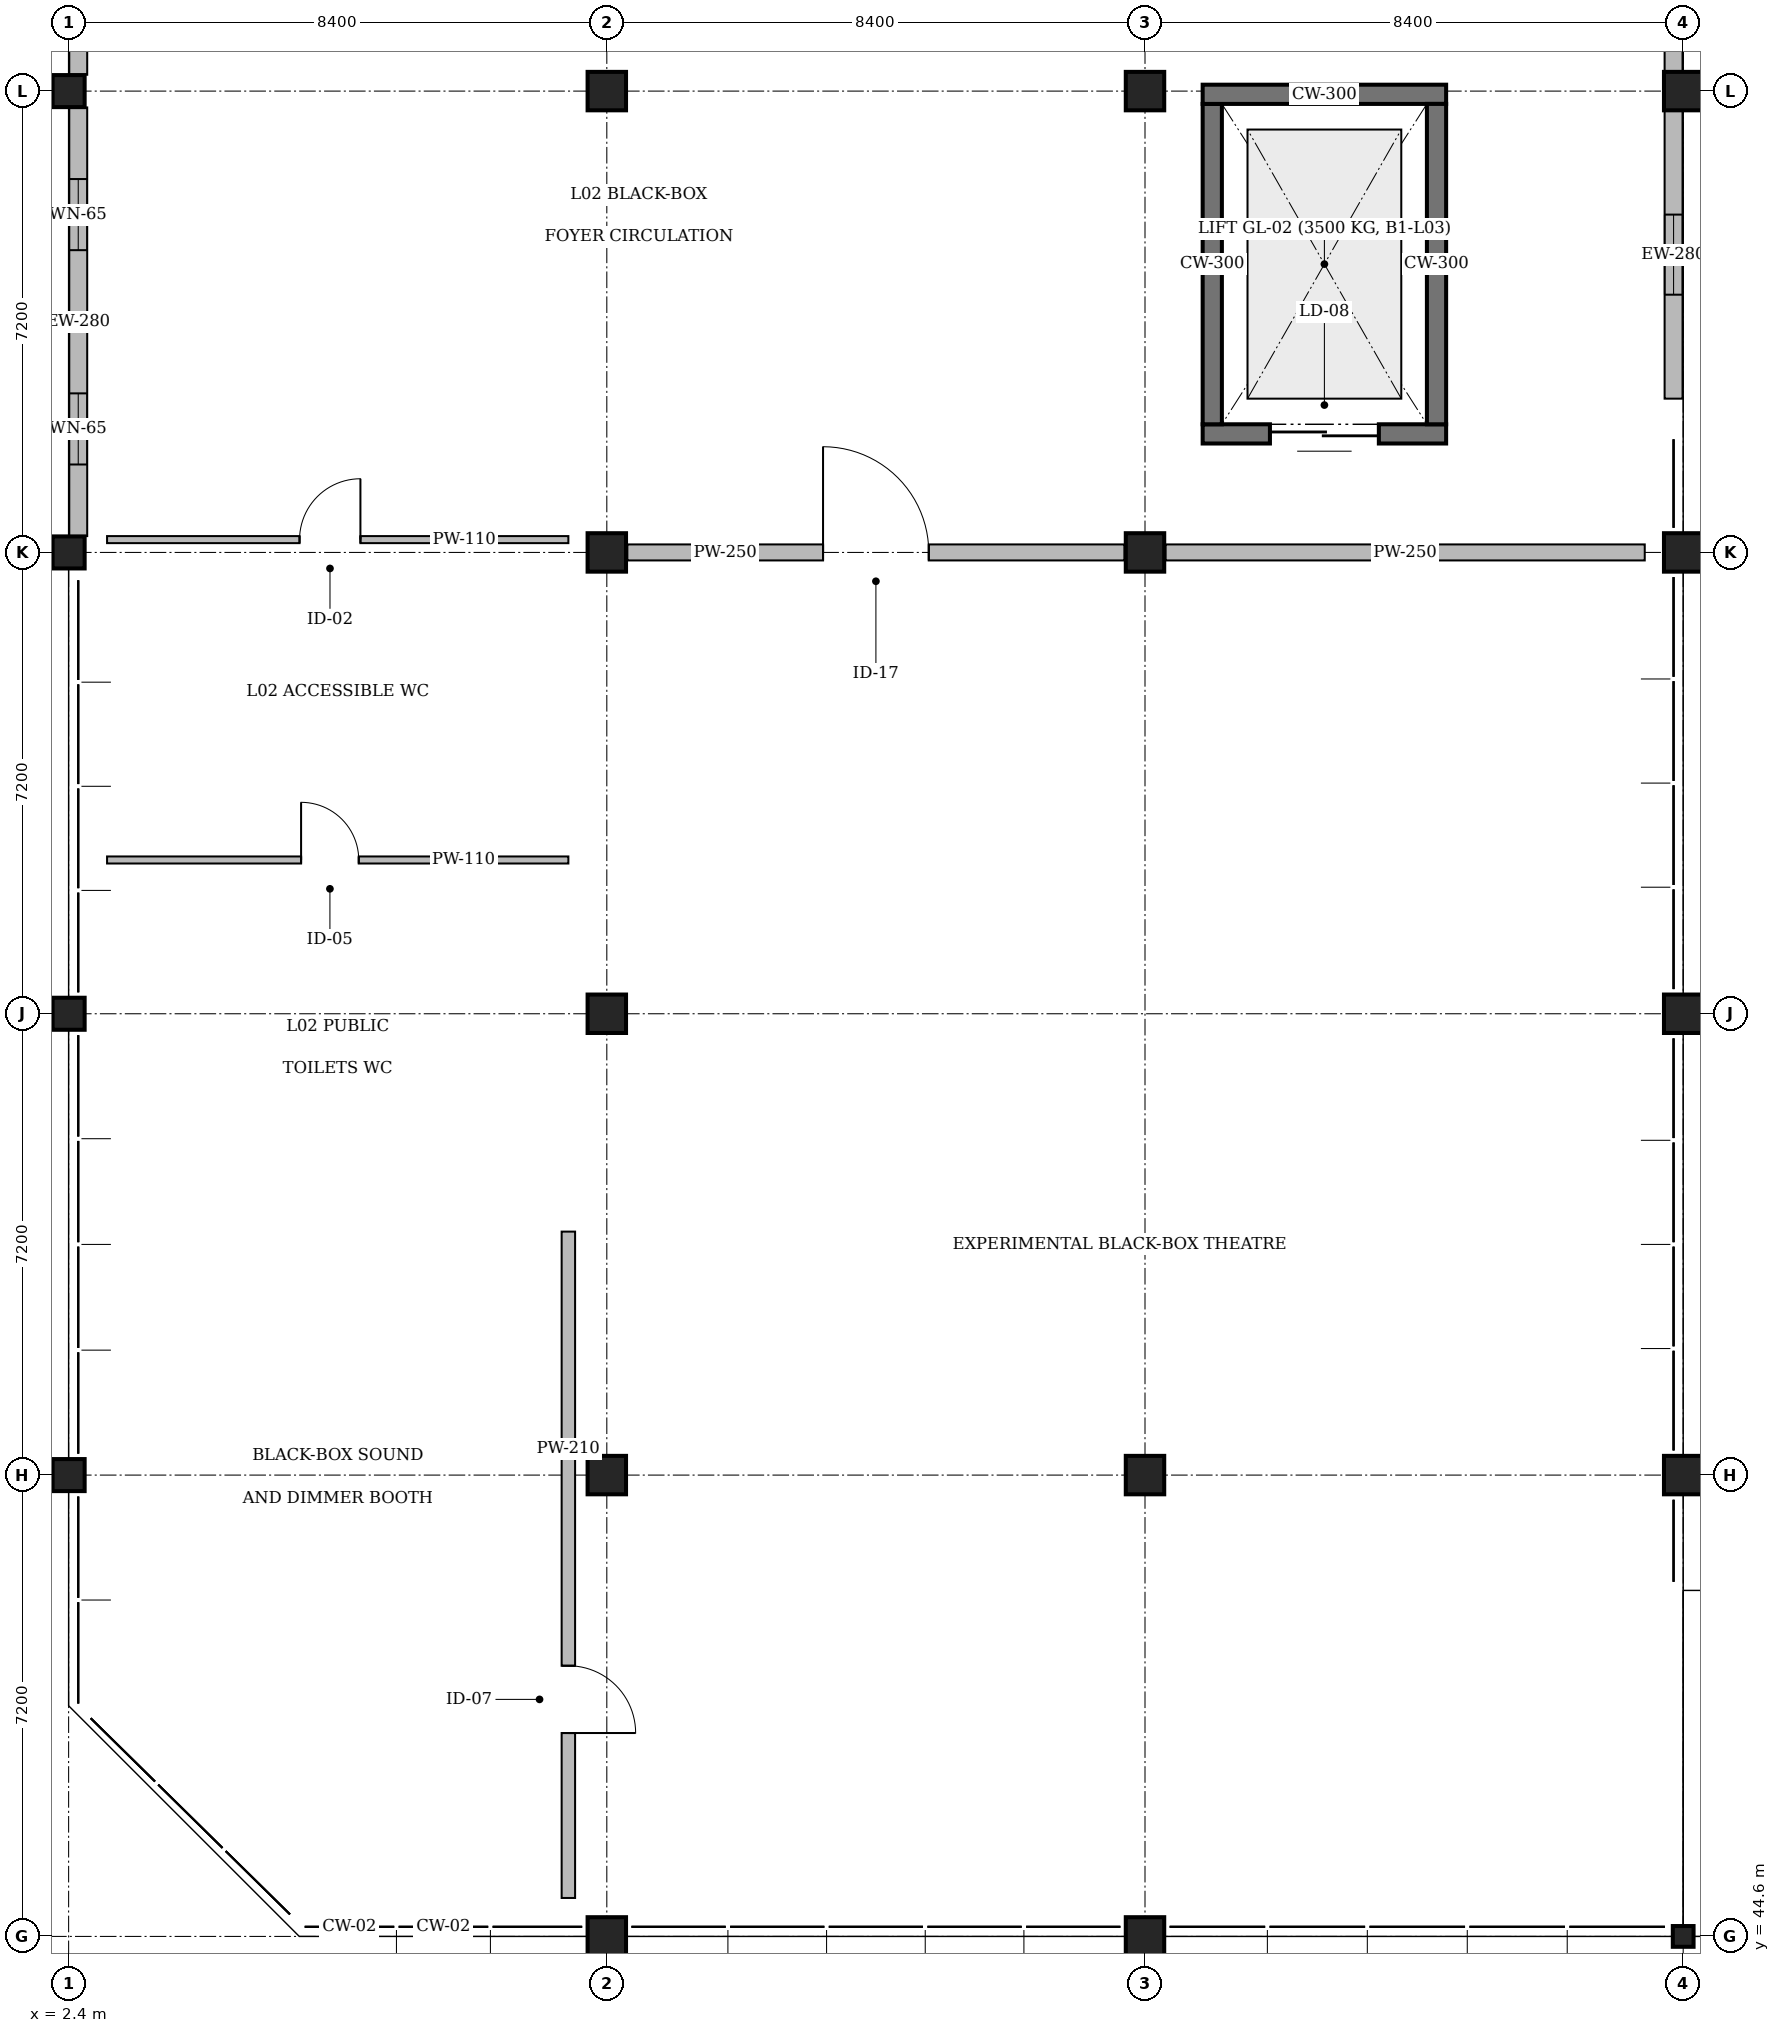
"""IFC4 building model, lengths in metres.
Left out: names, types, materials, properties, quantities, classifications, styles, units other than length and angle.
Written with IfcOpenShell. Run it as: python <this file> out.ifc"""

import sys

from ifc_helpers import new_model, si_unit, direction, frame, frame_2d, origin, origin_2d, place, context, subcontext, project, spatial, rectangle, hollow_circle, extrude, element, fill, save


model = new_model("IFC4")
c1 = context("Model", 3, precision=1e-05, world=origin(), true_north=direction((0.0, 1.0)))
c2 = subcontext(c1, "Body", "Model", "MODEL_VIEW")
j1 = project(units=[si_unit("LENGTHUNIT", "METRE"), si_unit("PLANEANGLEUNIT", "RADIAN")], contexts=[c1])
p1 = place(None, origin())
s1 = spatial("IfcSite", under=j1, at=p1, CompositionType="ELEMENT")
p2 = place(p1, origin())
s2 = spatial("IfcBuilding", under=s1, at=p2, CompositionType="ELEMENT")
p3 = place(p2, frame((0.0, 0.0, 9.0)))
s3 = spatial("IfcBuildingStorey", under=s2, at=p3, CompositionType="ELEMENT", Elevation=9.0)
for number, where, z_axis, x_axis in (
    (1, (2.4, 51.8, 0.0), (0.0, 0.0, 1.0), (1.0, 0.0, 0.0)),
    (2, (2.4, 59.0, 0.0), (0.0, 0.0, 1.0), (1.0, 0.0, 0.0)),
    (3, (2.4, 66.2, 0.0), (0.0, 0.0, 1.0), (1.0, 0.0, 0.0)),
    (4, (2.4, 73.4, 0.0), (0.0, 0.0, 1.0), (1.0, 0.0, 0.0)),
):
    element("IfcColumn", number, at=place(p3, frame(where, z_axis=z_axis, x_axis=x_axis)), inside=s3, PredefinedType="COLUMN", context=c2, shape_type="SweptSolid", body=[
        extrude(rectangle(XDim=0.5, YDim=0.5, at=origin_2d()), origin(), (0.0, 0.0, 1.0), 4.2),
    ])
for number, where, z_axis, x_axis in (
    (5, (10.8, 44.6, 0.0), (0.0, 0.0, 1.0), (1.0, 0.0, 0.0)),
    (6, (10.8, 51.8, 0.0), (0.0, 0.0, 1.0), (1.0, 0.0, 0.0)),
    (7, (10.8, 59.0, 0.0), (0.0, 0.0, 1.0), (1.0, 0.0, 0.0)),
    (8, (10.8, 66.2, 0.0), (0.0, 0.0, 1.0), (1.0, 0.0, 0.0)),
    (9, (10.8, 73.4, 0.0), (0.0, 0.0, 1.0), (1.0, 0.0, 0.0)),
    (10, (19.2, 44.6, 0.0), (0.0, 0.0, 1.0), (1.0, 0.0, 0.0)),
    (11, (19.2, 51.8, 0.0), (0.0, 0.0, 1.0), (1.0, 0.0, 0.0)),
    (12, (19.2, 66.2, 0.0), (0.0, 0.0, 1.0), (1.0, 0.0, 0.0)),
    (13, (19.2, 73.4, 0.0), (0.0, 0.0, 1.0), (1.0, 0.0, 0.0)),
):
    element("IfcColumn", number, at=place(p3, frame(where, z_axis=z_axis, x_axis=x_axis)), inside=s3, PredefinedType="COLUMN", context=c2, shape_type="SweptSolid", body=[
        extrude(rectangle(XDim=0.6, YDim=0.6, at=origin_2d()), origin(), (0.0, 0.0, 1.0), 4.2),
    ])
p4 = place(p3, frame((27.6, 44.6, 0.0), z_axis=(0.0, 0.0, 1.0), x_axis=(1.0, 0.0, 0.0)))
e14 = element("IfcColumn", 14, at=p4, inside=s3, PredefinedType="COLUMN", context=c2, shape_type="SweptSolid", body=[
    extrude(hollow_circle(Radius=0.162, WallThickness=0.012, at=origin_2d()), origin(), (0.0, 0.0, 1.0), 4.2),
])
for number, where, z_axis, x_axis in (
    (15, (27.6, 51.8, 0.0), (0.0, 0.0, 1.0), (1.0, 0.0, 0.0)),
    (16, (27.6, 59.0, 0.0), (0.0, 0.0, 1.0), (1.0, 0.0, 0.0)),
    (17, (27.6, 66.2, 0.0), (0.0, 0.0, 1.0), (1.0, 0.0, 0.0)),
    (18, (27.6, 73.4, 0.0), (0.0, 0.0, 1.0), (1.0, 0.0, 0.0)),
):
    element("IfcColumn", number, at=place(p3, frame(where, z_axis=z_axis, x_axis=x_axis)), inside=s3, PredefinedType="COLUMN", context=c2, shape_type="SweptSolid", body=[
        extrude(rectangle(XDim=0.6, YDim=0.6, at=origin_2d()), origin(), (0.0, 0.0, 1.0), 4.2),
    ])
p5 = place(p3, frame((23.9, 68.05, 0.0), z_axis=(0.0, 0.0, 1.0), x_axis=(-1.0, 0.0, 0.0)))
e19 = element("IfcWall", 19, at=p5, inside=s3, PredefinedType="SOLIDWALL", context=c2, shape_type="SweptSolid", body=[
    extrude(rectangle(XDim=3.8, YDim=0.3, at=frame_2d((1.9, 0.0))), origin(), (0.0, 0.0, 1.0), 4.2),
])
p6 = place(p5, frame((1.05, 0.0, 0.0)))
e20 = element("IfcOpeningElement", 20, at=p6, cuts=e19, PredefinedType="OPENING", context=c2, shape_type="SweptSolid", body=[
    extrude(rectangle(XDim=1.7, YDim=2.4, at=frame_2d((0.85, 1.2))), frame((0.0, 0.17, 0.0), z_axis=(0.0, -1.0, 0.0), x_axis=(1.0, 0.0, 0.0)), (0.0, 0.0, 1.0), 0.34),
])
p7 = place(p3, frame((20.25, 68.2, 0.0), z_axis=(0.0, 0.0, 1.0), x_axis=(0.0, 1.0, 0.0)))
e21 = element("IfcWall", 21, at=p7, inside=s3, PredefinedType="SOLIDWALL", context=c2, shape_type="SweptSolid", body=[
    extrude(rectangle(XDim=5.0, YDim=0.3, at=frame_2d((2.5, 0.0))), origin(), (0.0, 0.0, 1.0), 4.2),
])
p8 = place(p3, frame((20.1, 73.35, 0.0), z_axis=(0.0, 0.0, 1.0), x_axis=(1.0, 0.0, 0.0)))
e22 = element("IfcWall", 22, at=p8, inside=s3, PredefinedType="SOLIDWALL", context=c2, shape_type="SweptSolid", body=[
    extrude(rectangle(XDim=3.8, YDim=0.3, at=frame_2d((1.9, 0.0))), origin(), (0.0, 0.0, 1.0), 4.2),
])
p9 = place(p3, frame((23.75, 73.2, 0.0), z_axis=(0.0, 0.0, 1.0), x_axis=(0.0, -1.0, 0.0)))
e23 = element("IfcWall", 23, at=p9, inside=s3, PredefinedType="SOLIDWALL", context=c2, shape_type="SweptSolid", body=[
    extrude(rectangle(XDim=5.0, YDim=0.3, at=frame_2d((2.5, 0.0))), origin(), (0.0, 0.0, 1.0), 4.2),
])
p10 = place(p3, frame((2.55, 66.455, 0.0), z_axis=(0.0, 0.0, 1.0), x_axis=(0.0, 1.0, 0.0)))
e24 = element("IfcWall", 24, at=p10, inside=s3, PredefinedType="SOLIDWALL", context=c2, shape_type="SweptSolid", body=[
    extrude(rectangle(XDim=6.69, YDim=0.28, at=frame_2d((3.345, 0.0))), origin(), (0.0, 0.0, 1.0), 3.663),
])
p11 = place(p10, frame((1.117, 0.0, 0.95)))
e25 = element("IfcOpeningElement", 25, at=p11, cuts=e24, PredefinedType="OPENING", context=c2, shape_type="SweptSolid", body=[
    extrude(rectangle(XDim=1.11, YDim=1.85, at=frame_2d((0.555, 0.925))), frame((0.0, 0.16, 0.0), z_axis=(0.0, -1.0, 0.0), x_axis=(1.0, 0.0, 0.0)), (0.0, 0.0, 1.0), 0.32),
])
p12 = place(p10, frame((4.462, 0.0, 0.95)))
e26 = element("IfcOpeningElement", 26, at=p12, cuts=e24, PredefinedType="OPENING", context=c2, shape_type="SweptSolid", body=[
    extrude(rectangle(XDim=1.11, YDim=1.85, at=frame_2d((0.555, 0.925))), frame((0.0, 0.16, 0.0), z_axis=(0.0, -1.0, 0.0), x_axis=(1.0, 0.0, 0.0)), (0.0, 0.0, 1.0), 0.32),
])
p13 = place(p3, frame((2.55, 73.655, 0.0), z_axis=(0.0, 0.0, 1.0), x_axis=(0.0, 1.0, 0.0)))
e27 = element("IfcWall", 27, at=p13, inside=s3, PredefinedType="SOLIDWALL", context=c2, shape_type="SweptSolid", body=[
    extrude(rectangle(XDim=6.69, YDim=0.28, at=frame_2d((3.345, 0.0))), origin(), (0.0, 0.0, 1.0), 3.663),
])
p14 = place(p13, frame((1.073, 0.0, 0.95)))
e28 = element("IfcOpeningElement", 28, at=p14, cuts=e27, PredefinedType="OPENING", context=c2, shape_type="SweptSolid", body=[
    extrude(rectangle(XDim=1.2, YDim=2.05, at=frame_2d((0.6, 1.025))), frame((0.0, 0.16, 0.0), z_axis=(0.0, -1.0, 0.0), x_axis=(1.0, 0.0, 0.0)), (0.0, 0.0, 1.0), 0.32),
])
p15 = place(p13, frame((4.417, 0.0, 0.95)))
e29 = element("IfcOpeningElement", 29, at=p15, cuts=e27, PredefinedType="OPENING", context=c2, shape_type="SweptSolid", body=[
    extrude(rectangle(XDim=1.2, YDim=2.05, at=frame_2d((0.6, 1.025))), frame((0.0, 0.16, 0.0), z_axis=(0.0, -1.0, 0.0), x_axis=(1.0, 0.0, 0.0)), (0.0, 0.0, 1.0), 0.32),
])
p16 = place(p3, frame((27.45, 68.6, 0.0), z_axis=(0.0, 0.0, 1.0), x_axis=(0.0, 1.0, 0.0)))
e30 = element("IfcWall", 30, at=p16, inside=s3, PredefinedType="SOLIDWALL", context=c2, shape_type="SweptSolid", body=[
    extrude(rectangle(XDim=4.495, YDim=0.28, at=frame_2d((2.248, 0.0))), origin(), (0.0, 0.0, 1.0), 3.663),
])
p17 = place(p16, frame((1.623, 0.0, 0.95)))
e31 = element("IfcOpeningElement", 31, at=p17, cuts=e30, PredefinedType="OPENING", context=c2, shape_type="SweptSolid", body=[
    extrude(rectangle(XDim=1.25, YDim=1.9, at=frame_2d((0.625, 0.95))), frame((0.0, 0.16, 0.0), z_axis=(0.0, -1.0, 0.0), x_axis=(1.0, 0.0, 0.0)), (0.0, 0.0, 1.0), 0.32),
])
p18 = place(p3, frame((27.45, 73.705, 0.0), z_axis=(0.0, 0.0, 1.0), x_axis=(0.0, 1.0, 0.0)))
e32 = element("IfcWall", 32, at=p18, inside=s3, PredefinedType="SOLIDWALL", context=c2, shape_type="SweptSolid", body=[
    extrude(rectangle(XDim=6.59, YDim=0.28, at=frame_2d((3.295, 0.0))), origin(), (0.0, 0.0, 1.0), 3.663),
])
p19 = place(p18, frame((1.198, 0.0, 0.95)))
e33 = element("IfcOpeningElement", 33, at=p19, cuts=e32, PredefinedType="OPENING", context=c2, shape_type="SweptSolid", body=[
    extrude(rectangle(XDim=0.9, YDim=1.55, at=frame_2d((0.45, 0.775))), frame((0.0, 0.16, 0.0), z_axis=(0.0, -1.0, 0.0), x_axis=(1.0, 0.0, 0.0)), (0.0, 0.0, 1.0), 0.32),
])
p20 = place(p18, frame((4.492, 0.0, 0.95)))
e34 = element("IfcOpeningElement", 34, at=p20, cuts=e32, PredefinedType="OPENING", context=c2, shape_type="SweptSolid", body=[
    extrude(rectangle(XDim=0.9, YDim=1.55, at=frame_2d((0.45, 0.775))), frame((0.0, 0.16, 0.0), z_axis=(0.0, -1.0, 0.0), x_axis=(1.0, 0.0, 0.0)), (0.0, 0.0, 1.0), 0.32),
])
p21 = place(p3, frame((11.12, 66.2, 0.0), z_axis=(0.0, 0.0, 1.0), x_axis=(1.0, 0.0, 0.0)))
e35 = element("IfcWall", 35, at=p21, inside=s3, PredefinedType="PARTITIONING", context=c2, shape_type="SweptSolid", body=[
    extrude(rectangle(XDim=7.76, YDim=0.25, at=frame_2d((3.88, 0.0))), origin(), (0.0, 0.0, 1.0), 3.52),
])
p22 = place(p21, frame((3.055, 0.0, 0.0)))
e36 = element("IfcOpeningElement", 36, at=p22, cuts=e35, PredefinedType="OPENING", context=c2, shape_type="SweptSolid", body=[
    extrude(rectangle(XDim=1.65, YDim=2.25, at=frame_2d((0.825, 1.125))), frame((0.0, 0.145, 0.0), z_axis=(0.0, -1.0, 0.0), x_axis=(1.0, 0.0, 0.0)), (0.0, 0.0, 1.0), 0.29),
])
p23 = place(p3, frame((19.52, 66.2, 0.0), z_axis=(0.0, 0.0, 1.0), x_axis=(1.0, 0.0, 0.0)))
e37 = element("IfcWall", 37, at=p23, inside=s3, PredefinedType="PARTITIONING", context=c2, shape_type="SweptSolid", body=[
    extrude(rectangle(XDim=7.48, YDim=0.25, at=frame_2d((3.74, 0.0))), origin(), (0.0, 0.0, 1.0), 3.95),
])
p24 = place(p3, frame((10.2, 55.6, 0.0), z_axis=(0.0, 0.0, 1.0), x_axis=(0.0, -1.0, 0.0)))
e38 = element("IfcWall", 38, at=p24, inside=s3, PredefinedType="PARTITIONING", context=c2, shape_type="SweptSolid", body=[
    extrude(rectangle(XDim=10.4, YDim=0.21, at=frame_2d((5.2, 0.0))), origin(), (0.0, 0.0, 1.0), 3.97),
])
p25 = place(p24, frame((6.776, 0.0, 0.0)))
e39 = element("IfcOpeningElement", 39, at=p25, cuts=e38, PredefinedType="OPENING", context=c2, shape_type="SweptSolid", body=[
    extrude(rectangle(XDim=1.05, YDim=2.15, at=frame_2d((0.525, 1.075))), frame((0.0, 0.125, 0.0), z_axis=(0.0, -1.0, 0.0), x_axis=(1.0, 0.0, 0.0)), (0.0, 0.0, 1.0), 0.25),
])
p26 = place(p3, frame((3.0, 61.4, 0.0), z_axis=(0.0, 0.0, 1.0), x_axis=(1.0, 0.0, 0.0)))
e40 = element("IfcWall", 40, at=p26, inside=s3, PredefinedType="PARTITIONING", context=c2, shape_type="SweptSolid", body=[
    extrude(rectangle(XDim=7.2, YDim=0.11, at=frame_2d((3.6, 0.0))), origin(), (0.0, 0.0, 1.0), 3.95),
])
p27 = place(p26, frame((3.028, 0.0, 0.0)))
e41 = element("IfcOpeningElement", 41, at=p27, cuts=e40, PredefinedType="OPENING", context=c2, shape_type="SweptSolid", body=[
    extrude(rectangle(XDim=0.9, YDim=2.15, at=frame_2d((0.45, 1.075))), frame((0.0, 0.075, 0.0), z_axis=(0.0, -1.0, 0.0), x_axis=(1.0, 0.0, 0.0)), (0.0, 0.0, 1.0), 0.15),
])
p28 = place(p3, frame((3.0, 66.4, 0.0), z_axis=(0.0, 0.0, 1.0), x_axis=(1.0, 0.0, 0.0)))
e42 = element("IfcWall", 42, at=p28, inside=s3, PredefinedType="PARTITIONING", context=c2, shape_type="SweptSolid", body=[
    extrude(rectangle(XDim=7.2, YDim=0.11, at=frame_2d((3.6, 0.0))), origin(), (0.0, 0.0, 1.0), 3.52),
])
p29 = place(p28, frame((3.004, 0.0, 0.0)))
e43 = element("IfcOpeningElement", 43, at=p29, cuts=e42, PredefinedType="OPENING", context=c2, shape_type="SweptSolid", body=[
    extrude(rectangle(XDim=0.95, YDim=2.1, at=frame_2d((0.475, 1.05))), frame((0.0, 0.075, 0.0), z_axis=(0.0, -1.0, 0.0), x_axis=(1.0, 0.0, 0.0)), (0.0, 0.0, 1.0), 0.15),
])
p30 = place(p6, origin())
e44 = element("IfcDoor", 44, at=p30, inside=s3, OperationType="DOUBLE_DOOR_SLIDING", PredefinedType="DOOR", context=c2, shape_type="SweptSolid", body=[
    extrude(rectangle(XDim=1.7, YDim=2.4, at=frame_2d((0.85, 1.2))), frame((0.0, 0.025, 0.0), z_axis=(0.0, -1.0, 0.0), x_axis=(1.0, 0.0, 0.0)), (0.0, 0.0, 1.0), 0.05),
])
fill(e20, e44)
p31 = place(p11, origin())
e45 = element("IfcWindow", 45, at=p31, inside=s3, PartitioningType="SINGLE_PANEL", PredefinedType="WINDOW", context=c2, shape_type="SweptSolid", body=[
    extrude(rectangle(XDim=1.11, YDim=1.85, at=frame_2d((0.555, 0.925))), frame((0.0, 0.03, 0.0), z_axis=(0.0, -1.0, 0.0), x_axis=(1.0, 0.0, 0.0)), (0.0, 0.0, 1.0), 0.06),
])
fill(e25, e45)
p32 = place(p12, origin())
e46 = element("IfcWindow", 46, at=p32, inside=s3, PartitioningType="SINGLE_PANEL", PredefinedType="WINDOW", context=c2, shape_type="SweptSolid", body=[
    extrude(rectangle(XDim=1.11, YDim=1.85, at=frame_2d((0.555, 0.925))), frame((0.0, 0.03, 0.0), z_axis=(0.0, -1.0, 0.0), x_axis=(1.0, 0.0, 0.0)), (0.0, 0.0, 1.0), 0.06),
])
fill(e26, e46)
p33 = place(p17, origin())
e47 = element("IfcWindow", 47, at=p33, inside=s3, PartitioningType="SINGLE_PANEL", PredefinedType="WINDOW", context=c2, shape_type="SweptSolid", body=[
    extrude(rectangle(XDim=1.25, YDim=1.9, at=frame_2d((0.625, 0.95))), frame((0.0, 0.03, 0.0), z_axis=(0.0, -1.0, 0.0), x_axis=(1.0, 0.0, 0.0)), (0.0, 0.0, 1.0), 0.06),
])
fill(e31, e47)
p34 = place(p22, origin())
e48 = element("IfcDoor", 48, at=p34, inside=s3, OperationType="DOUBLE_DOOR_SINGLE_SWING", PredefinedType="DOOR", context=c2, shape_type="SweptSolid", body=[
    extrude(rectangle(XDim=1.65, YDim=2.25, at=frame_2d((0.825, 1.125))), frame((0.0, 0.025, 0.0), z_axis=(0.0, -1.0, 0.0), x_axis=(1.0, 0.0, 0.0)), (0.0, 0.0, 1.0), 0.05),
])
fill(e36, e48)
p35 = place(p25, origin())
e49 = element("IfcDoor", 49, at=p35, inside=s3, OperationType="SINGLE_SWING_RIGHT", PredefinedType="DOOR", context=c2, shape_type="SweptSolid", body=[
    extrude(rectangle(XDim=1.05, YDim=2.15, at=frame_2d((0.525, 1.075))), frame((0.0, 0.025, 0.0), z_axis=(0.0, -1.0, 0.0), x_axis=(1.0, 0.0, 0.0)), (0.0, 0.0, 1.0), 0.05),
])
fill(e39, e49)
p36 = place(p27, origin())
e50 = element("IfcDoor", 50, at=p36, inside=s3, OperationType="SINGLE_SWING_LEFT", PredefinedType="DOOR", context=c2, shape_type="SweptSolid", body=[
    extrude(rectangle(XDim=0.9, YDim=2.15, at=frame_2d((0.45, 1.075))), frame((0.0, 0.025, 0.0), z_axis=(0.0, -1.0, 0.0), x_axis=(1.0, 0.0, 0.0)), (0.0, 0.0, 1.0), 0.05),
])
fill(e41, e50)
p37 = place(p29, origin())
e51 = element("IfcDoor", 51, at=p37, inside=s3, OperationType="SINGLE_SWING_RIGHT", PredefinedType="DOOR", context=c2, shape_type="SweptSolid", body=[
    extrude(rectangle(XDim=0.95, YDim=2.1, at=frame_2d((0.475, 1.05))), frame((0.0, 0.025, 0.0), z_axis=(0.0, -1.0, 0.0), x_axis=(1.0, 0.0, 0.0)), (0.0, 0.0, 1.0), 0.05),
])
fill(e43, e51)
save(model, sys.argv[1])
